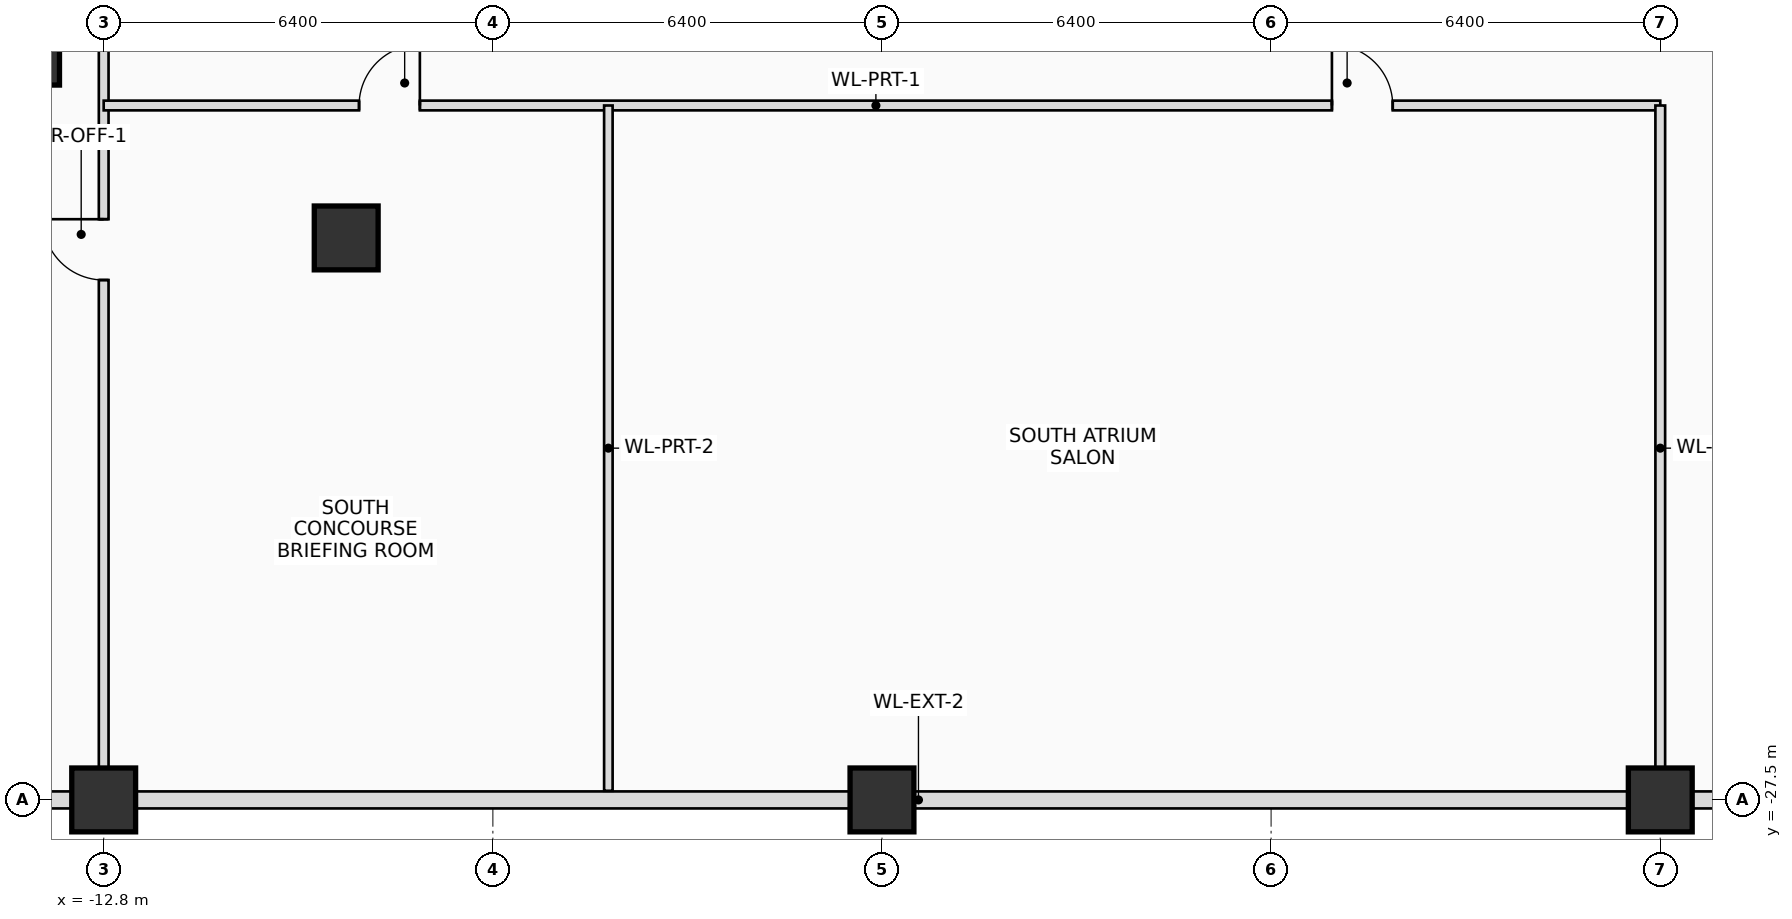
"""IFC4 building model, lengths in metres.
Left out: names, types, materials, properties, quantities, classifications, styles, units other than length and angle.
Written with IfcOpenShell. Run it as: python <this file> out.ifc"""

import sys

from ifc_helpers import new_model, si_unit, direction, frame, frame_2d, origin, origin_2d, place, context, subcontext, project, spatial, rectangle, extrude, source, transform, mapped, element, fill, save


model = new_model("IFC4")
c1 = context("Model", 3, precision=1e-05, world=origin(), true_north=direction((0.0, 1.0)))
c2 = subcontext(c1, "Body", "Model", "MODEL_VIEW")
j1 = project(units=[si_unit("LENGTHUNIT", "METRE"), si_unit("PLANEANGLEUNIT", "RADIAN")], contexts=[c1])
p1 = place(None, origin())
s1 = spatial("IfcSite", under=j1, at=p1, CompositionType="ELEMENT")
p2 = place(p1, origin())
s2 = spatial("IfcBuilding", under=s1, at=p2, CompositionType="ELEMENT")
p3 = place(p2, frame((0.0, 0.0, 12.3)))
s3 = spatial("IfcBuildingStorey", under=s2, at=p3, CompositionType="ELEMENT", Elevation=12.3)
m1 = source(origin(), c2, "Body", "SweptSolid", [
    extrude(rectangle(XDim=1.05, YDim=1.05, at=origin_2d()), origin(), (0.0, 0.0, 1.0), 3.9),
])
for number, where, z_axis, x_axis in (
    (1, (-12.8, -27.5, 0.0), (0.0, 0.0, 1.0), (1.0, 0.0, 0.0)),
    (2, (0.0, -27.5, 0.0), (0.0, 0.0, 1.0), (1.0, 0.0, 0.0)),
    (3, (12.8, -27.5, 0.0), (0.0, 0.0, 1.0), (1.0, 0.0, 0.0)),
    (4, (-8.812, -18.258, 0.0), (0.0, 0.0, 1.0), (1.0, 0.0, 0.0)),
    (5, (-14.052, -15.219, 0.0), (0.0, 0.0, 1.0), (1.0, 0.0, 0.0)),
):
    element("IfcColumn", number, at=place(p3, frame(where, z_axis=z_axis, x_axis=x_axis)), inside=s3, PredefinedType="COLUMN", context=c2, shape_type="MappedRepresentation", body=[
        mapped(m1, transform((0.0, 0.0, 0.0), scale=1.0)),
    ])
p4 = place(p3, frame((34.0, -27.5, 0.0), z_axis=(0.0, 0.0, 1.0), x_axis=(-1.0, 0.0, 0.0)))
e6 = element("IfcWall", 6, at=p4, inside=s3, PredefinedType="SOLIDWALL", context=c2, shape_type="SweptSolid", body=[
    extrude(rectangle(XDim=68.0, YDim=0.28, at=frame_2d((34.0, 0.0))), origin(), (0.0, 0.0, 1.0), 2.65),
])
p5 = place(p4, frame((16.0, 0.0, 0.65)))
e7 = element("IfcOpeningElement", 7, at=p5, cuts=e6, PredefinedType="OPENING", context=c2, shape_type="SweptSolid", body=[
    extrude(rectangle(XDim=1.8, YDim=1.8, at=frame_2d((0.9, 0.9))), frame((0.0, 0.15, 0.0), z_axis=(0.0, -1.0, 0.0), x_axis=(1.0, 0.0, 0.0)), (0.0, 0.0, 1.0), 0.3),
])
p6 = place(p4, frame((49.0, 0.0, 0.65)))
e8 = element("IfcOpeningElement", 8, at=p6, cuts=e6, PredefinedType="OPENING", context=c2, shape_type="SweptSolid", body=[
    extrude(rectangle(XDim=1.8, YDim=1.8, at=frame_2d((0.9, 0.9))), frame((0.0, 0.15, 0.0), z_axis=(0.0, -1.0, 0.0), x_axis=(1.0, 0.0, 0.0)), (0.0, 0.0, 1.0), 0.3),
])
p7 = place(p3, frame((-12.8, -27.35, 0.0), z_axis=(0.0, 0.0, 1.0), x_axis=(0.0, 1.0, 0.0)))
e9 = element("IfcWall", 9, at=p7, inside=s3, PredefinedType="PARTITIONING", context=c2, shape_type="SweptSolid", body=[
    extrude(rectangle(XDim=41.35, YDim=0.16, at=frame_2d((20.675, 0.0))), origin(), (0.0, 0.0, 1.0), 2.775),
])
p8 = place(p7, frame((8.4, 0.0, 0.0)))
e10 = element("IfcOpeningElement", 10, at=p8, cuts=e9, PredefinedType="OPENING", context=c2, shape_type="SweptSolid", body=[
    extrude(rectangle(XDim=1.0, YDim=2.25, at=frame_2d((0.5, 1.125))), frame((0.0, 0.09, 0.0), z_axis=(0.0, -1.0, 0.0), x_axis=(1.0, 0.0, 0.0)), (0.0, 0.0, 1.0), 0.18),
])
p9 = place(p3, frame((-12.8, -16.08, 0.0), z_axis=(0.0, 0.0, 1.0), x_axis=(1.0, 0.0, 0.0)))
e11 = element("IfcWall", 11, at=p9, inside=s3, PredefinedType="PARTITIONING", context=c2, shape_type="SweptSolid", body=[
    extrude(rectangle(XDim=25.6, YDim=0.16, at=frame_2d((12.8, 0.0))), origin(), (0.0, 0.0, 1.0), 3.025),
])
p10 = place(p9, frame((4.2, 0.0, 0.0)))
e12 = element("IfcOpeningElement", 12, at=p10, cuts=e11, PredefinedType="OPENING", context=c2, shape_type="SweptSolid", body=[
    extrude(rectangle(XDim=1.0, YDim=2.25, at=frame_2d((0.5, 1.125))), frame((0.0, 0.09, 0.0), z_axis=(0.0, -1.0, 0.0), x_axis=(1.0, 0.0, 0.0)), (0.0, 0.0, 1.0), 0.18),
])
p11 = place(p9, frame((20.2, 0.0, 0.0)))
e13 = element("IfcOpeningElement", 13, at=p11, cuts=e11, PredefinedType="OPENING", context=c2, shape_type="SweptSolid", body=[
    extrude(rectangle(XDim=1.0, YDim=2.25, at=frame_2d((0.5, 1.125))), frame((0.0, 0.09, 0.0), z_axis=(0.0, -1.0, 0.0), x_axis=(1.0, 0.0, 0.0)), (0.0, 0.0, 1.0), 0.18),
])
p12 = place(p3, frame((12.8, -27.35, 0.0), z_axis=(0.0, 0.0, 1.0), x_axis=(0.0, 1.0, 0.0)))
e14 = element("IfcWall", 14, at=p12, inside=s3, PredefinedType="PARTITIONING", context=c2, shape_type="SweptSolid", body=[
    extrude(rectangle(XDim=11.27, YDim=0.16, at=frame_2d((5.635, 0.0))), origin(), (0.0, 0.0, 1.0), 3.025),
])
p13 = place(p3, frame((-4.5, -27.35, 0.0), z_axis=(0.0, 0.0, 1.0), x_axis=(0.0, 1.0, 0.0)))
e15 = element("IfcWall", 15, at=p13, inside=s3, PredefinedType="PARTITIONING", context=c2, shape_type="SweptSolid", body=[
    extrude(rectangle(XDim=11.27, YDim=0.14, at=frame_2d((5.635, 0.0))), origin(), (0.0, 0.0, 1.0), 3.57),
])
p14 = place(p8, origin())
e16 = element("IfcDoor", 16, at=p14, inside=s3, OperationType="SINGLE_SWING_RIGHT", PredefinedType="DOOR", context=c2, shape_type="SweptSolid", body=[
    extrude(rectangle(XDim=1.0, YDim=2.25, at=frame_2d((0.5, 1.125))), frame((0.0, 0.025, 0.0), z_axis=(0.0, -1.0, 0.0), x_axis=(1.0, 0.0, 0.0)), (0.0, 0.0, 1.0), 0.05),
])
fill(e10, e16)
p15 = place(p10, origin())
e17 = element("IfcDoor", 17, at=p15, inside=s3, OperationType="SINGLE_SWING_RIGHT", PredefinedType="DOOR", context=c2, shape_type="SweptSolid", body=[
    extrude(rectangle(XDim=1.0, YDim=2.25, at=frame_2d((0.5, 1.125))), frame((0.0, 0.025, 0.0), z_axis=(0.0, -1.0, 0.0), x_axis=(1.0, 0.0, 0.0)), (0.0, 0.0, 1.0), 0.05),
])
fill(e12, e17)
p16 = place(p11, origin())
e18 = element("IfcDoor", 18, at=p16, inside=s3, OperationType="SINGLE_SWING_LEFT", PredefinedType="DOOR", context=c2, shape_type="SweptSolid", body=[
    extrude(rectangle(XDim=1.0, YDim=2.25, at=frame_2d((0.5, 1.125))), frame((0.0, 0.025, 0.0), z_axis=(0.0, -1.0, 0.0), x_axis=(1.0, 0.0, 0.0)), (0.0, 0.0, 1.0), 0.05),
])
fill(e13, e18)
save(model, sys.argv[1])
